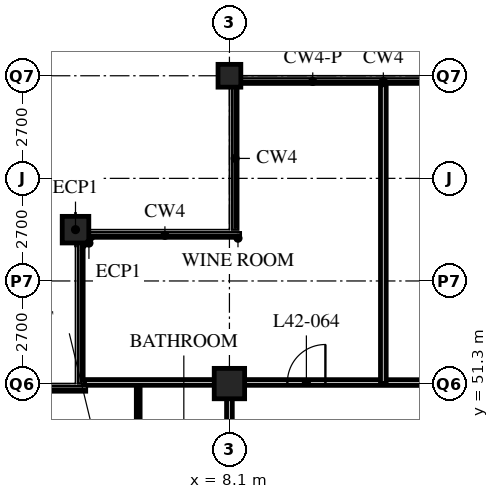
"""IFC4 building model, lengths in metres.
Left out: names, types, materials, properties, quantities, classifications, styles, units other than length and angle.
Written with IfcOpenShell. Run it as: python <this file> out.ifc"""

import sys

from ifc_helpers import new_model, si_unit, direction, frame, frame_2d, origin, origin_2d, place, context, subcontext, project, spatial, rectangle, hollow_rectangle, extrude, element, fill, save


model = new_model("IFC4")
c1 = context("Model", 3, precision=1e-05, world=origin(), true_north=direction((0.0, 1.0)))
c2 = subcontext(c1, "Body", "Model", "MODEL_VIEW")
j1 = project(units=[si_unit("LENGTHUNIT", "METRE"), si_unit("PLANEANGLEUNIT", "RADIAN")], contexts=[c1])
p1 = place(None, origin())
s1 = spatial("IfcSite", under=j1, at=p1, CompositionType="ELEMENT")
p2 = place(p1, origin())
s2 = spatial("IfcBuilding", under=s1, at=p2, CompositionType="ELEMENT")
p3 = place(p2, frame((0.0, 0.0, 165.0)))
s3 = spatial("IfcBuildingStorey", under=s2, at=p3, CompositionType="ELEMENT", Elevation=165.0)
p4 = place(p3, frame((4.05, 55.35, 0.0), z_axis=(0.0, 0.0, 1.0), x_axis=(1.0, 0.0, 0.0)))
e1 = element("IfcColumn", 1, at=p4, inside=s3, PredefinedType="COLUMN", context=c2, shape_type="SweptSolid", body=[
    extrude(hollow_rectangle(XDim=0.7, YDim=0.7, WallThickness=0.07, at=origin_2d()), origin(), (0.0, 0.0, 1.0), 5.4),
])
p5 = place(p3, frame((8.1, 51.3, 0.0), z_axis=(0.0, 0.0, 1.0), x_axis=(1.0, 0.0, 0.0)))
e2 = element("IfcColumn", 2, at=p5, inside=s3, PredefinedType="COLUMN", context=c2, shape_type="SweptSolid", body=[
    extrude(hollow_rectangle(XDim=0.8, YDim=0.8, WallThickness=0.08, at=origin_2d()), origin(), (0.0, 0.0, 1.0), 5.4),
])
p6 = place(p3, frame((8.1, 59.4, 0.0), z_axis=(0.0, 0.0, 1.0), x_axis=(1.0, 0.0, 0.0)))
e3 = element("IfcColumn", 3, at=p6, inside=s3, PredefinedType="COLUMN", context=c2, shape_type="SweptSolid", body=[
    extrude(hollow_rectangle(XDim=0.6, YDim=0.6, WallThickness=0.05, at=origin_2d()), origin(), (0.0, 0.0, 1.0), 5.4),
])
p7 = place(p3, frame((8.1, 51.33, 0.0), z_axis=(0.0, 0.0, 1.0), x_axis=(0.999999725116, -0.000741463917, 0.0)))
e4 = element("IfcWall", 4, at=p7, inside=s3, PredefinedType="PARTITIONING", context=c2, shape_type="SweptSolid", body=[
    extrude(rectangle(XDim=40.5, YDim=0.15, at=frame_2d((20.25, 0.0))), origin(), (0.0, 0.0, 1.0), 4.42),
])
p8 = place(p7, frame((8.95, 0.0, 0.0)))
e5 = element("IfcOpeningElement", 5, at=p8, cuts=e4, PredefinedType="OPENING", context=c2, shape_type="SweptSolid", body=[
    extrude(rectangle(XDim=1.8, YDim=2.4, at=frame_2d((0.9, 1.2))), frame((0.0, 0.085, 0.0), z_axis=(0.0, -1.0, 0.0), x_axis=(1.0, 0.0, 0.0)), (0.0, 0.0, 1.0), 0.17),
])
p9 = place(p7, frame((17.05, 0.0, 0.0)))
e6 = element("IfcOpeningElement", 6, at=p9, cuts=e4, PredefinedType="OPENING", context=c2, shape_type="SweptSolid", body=[
    extrude(rectangle(XDim=1.8, YDim=2.4, at=frame_2d((0.9, 1.2))), frame((0.0, 0.085, 0.0), z_axis=(0.0, -1.0, 0.0), x_axis=(1.0, 0.0, 0.0)), (0.0, 0.0, 1.0), 0.17),
])
p10 = place(p7, frame((20.65, 0.0, 0.0)))
e7 = element("IfcOpeningElement", 7, at=p10, cuts=e4, PredefinedType="OPENING", context=c2, shape_type="SweptSolid", body=[
    extrude(rectangle(XDim=1.0, YDim=2.1, at=frame_2d((0.5, 1.05))), frame((0.0, 0.085, 0.0), z_axis=(0.0, -1.0, 0.0), x_axis=(1.0, 0.0, 0.0)), (0.0, 0.0, 1.0), 0.17),
])
p11 = place(p7, frame((28.75, 0.0, 0.0)))
e8 = element("IfcOpeningElement", 8, at=p11, cuts=e4, PredefinedType="OPENING", context=c2, shape_type="SweptSolid", body=[
    extrude(rectangle(XDim=1.0, YDim=2.1, at=frame_2d((0.5, 1.05))), frame((0.0, 0.085, 0.0), z_axis=(0.0, -1.0, 0.0), x_axis=(1.0, 0.0, 0.0)), (0.0, 0.0, 1.0), 0.17),
])
p12 = place(p7, frame((37.975, 0.0, 0.0)))
e9 = element("IfcOpeningElement", 9, at=p12, cuts=e4, PredefinedType="OPENING", context=c2, shape_type="SweptSolid", body=[
    extrude(rectangle(XDim=1.0, YDim=2.1, at=frame_2d((0.5, 1.05))), frame((0.0, 0.085, 0.0), z_axis=(0.0, -1.0, 0.0), x_axis=(1.0, 0.0, 0.0)), (0.0, 0.0, 1.0), 0.17),
])
p13 = place(p7, frame((1.525, 0.0, 0.0)))
e10 = element("IfcOpeningElement", 10, at=p13, cuts=e4, PredefinedType="OPENING", context=c2, shape_type="SweptSolid", body=[
    extrude(rectangle(XDim=1.0, YDim=2.1, at=frame_2d((0.5, 1.05))), frame((0.0, 0.085, 0.0), z_axis=(0.0, -1.0, 0.0), x_axis=(1.0, 0.0, 0.0)), (0.0, 0.0, 1.0), 0.17),
])
p14 = place(p3, frame((8.1, 18.9, 0.0), z_axis=(0.0, 0.0, 1.0), x_axis=(0.0, 1.0, 0.0)))
e11 = element("IfcWall", 11, at=p14, inside=s3, PredefinedType="PARTITIONING", context=c2, shape_type="SweptSolid", body=[
    extrude(rectangle(XDim=32.43, YDim=0.15, at=frame_2d((16.215, 0.0))), origin(), (0.0, 0.0, 1.0), 4.42),
])
p15 = place(p14, frame((1.525, 0.0, 0.0)))
e12 = element("IfcOpeningElement", 12, at=p15, cuts=e11, PredefinedType="OPENING", context=c2, shape_type="SweptSolid", body=[
    extrude(rectangle(XDim=1.0, YDim=2.1, at=frame_2d((0.5, 1.05))), frame((0.0, 0.085, 0.0), z_axis=(0.0, -1.0, 0.0), x_axis=(1.0, 0.0, 0.0)), (0.0, 0.0, 1.0), 0.17),
])
p16 = place(p14, frame((8.95, 0.0, 0.0)))
e13 = element("IfcOpeningElement", 13, at=p16, cuts=e11, PredefinedType="OPENING", context=c2, shape_type="SweptSolid", body=[
    extrude(rectangle(XDim=1.8, YDim=2.4, at=frame_2d((0.9, 1.2))), frame((0.0, 0.085, 0.0), z_axis=(0.0, -1.0, 0.0), x_axis=(1.0, 0.0, 0.0)), (0.0, 0.0, 1.0), 0.17),
])
p17 = place(p14, frame((12.55, 0.0, 0.0)))
e14 = element("IfcOpeningElement", 14, at=p17, cuts=e11, PredefinedType="OPENING", context=c2, shape_type="SweptSolid", body=[
    extrude(rectangle(XDim=1.0, YDim=2.1, at=frame_2d((0.5, 1.05))), frame((0.0, 0.085, 0.0), z_axis=(0.0, -1.0, 0.0), x_axis=(1.0, 0.0, 0.0)), (0.0, 0.0, 1.0), 0.17),
])
p18 = place(p14, frame((20.65, 0.0, 0.0)))
e15 = element("IfcOpeningElement", 15, at=p18, cuts=e11, PredefinedType="OPENING", context=c2, shape_type="SweptSolid", body=[
    extrude(rectangle(XDim=1.0, YDim=2.1, at=frame_2d((0.5, 1.05))), frame((0.0, 0.085, 0.0), z_axis=(0.0, -1.0, 0.0), x_axis=(1.0, 0.0, 0.0)), (0.0, 0.0, 1.0), 0.17),
])
p19 = place(p14, frame((29.05, 0.0, 0.0)))
e16 = element("IfcOpeningElement", 16, at=p19, cuts=e11, PredefinedType="OPENING", context=c2, shape_type="SweptSolid", body=[
    extrude(rectangle(XDim=1.0, YDim=2.1, at=frame_2d((0.5, 1.05))), frame((0.0, 0.085, 0.0), z_axis=(0.0, -1.0, 0.0), x_axis=(1.0, 0.0, 0.0)), (0.0, 0.0, 1.0), 0.17),
])
p20 = place(p3, frame((5.7, 49.1, 0.0), z_axis=(0.0, 0.0, 1.0), x_axis=(0.0, 1.0, 0.0)))
e17 = element("IfcWall", 17, at=p20, inside=s3, PredefinedType="PARTITIONING", context=c2, shape_type="SweptSolid", body=[
    extrude(rectangle(XDim=2.23, YDim=0.1, at=frame_2d((1.115, 0.0))), origin(), (0.0, 0.0, 1.0), 5.19),
])
p21 = place(p3, frame((4.285, 51.33, 0.0), z_axis=(0.0, 0.0, 1.0), x_axis=(1.0, 0.0, 0.0)))
e18 = element("IfcWall", 18, at=p21, inside=s3, PredefinedType="PARTITIONING", context=c2, shape_type="SweptSolid", body=[
    extrude(rectangle(XDim=3.815, YDim=0.15, at=frame_2d((1.907, 0.0))), origin(), (0.0, 0.0, 1.0), 4.42),
])
p22 = place(p3, frame((12.15, 51.3, 0.0), z_axis=(0.0, 0.0, 1.0), x_axis=(0.0, 1.0, 0.0)))
e19 = element("IfcWall", 19, at=p22, inside=s3, PredefinedType="PARTITIONING", context=c2, shape_type="SweptSolid", body=[
    extrude(rectangle(XDim=7.865, YDim=0.15, at=frame_2d((3.932, 0.0))), origin(), (0.0, 0.0, 1.0), 5.19),
])
p23 = place(p13, origin())
e20 = element("IfcDoor", 20, at=p23, inside=s3, OperationType="SINGLE_SWING_RIGHT", PredefinedType="DOOR", context=c2, shape_type="SweptSolid", body=[
    extrude(rectangle(XDim=1.0, YDim=2.1, at=frame_2d((0.5, 1.05))), frame((0.0, 0.025, 0.0), z_axis=(0.0, -1.0, 0.0), x_axis=(1.0, 0.0, 0.0)), (0.0, 0.0, 1.0), 0.05),
])
fill(e10, e20)
save(model, sys.argv[1])
